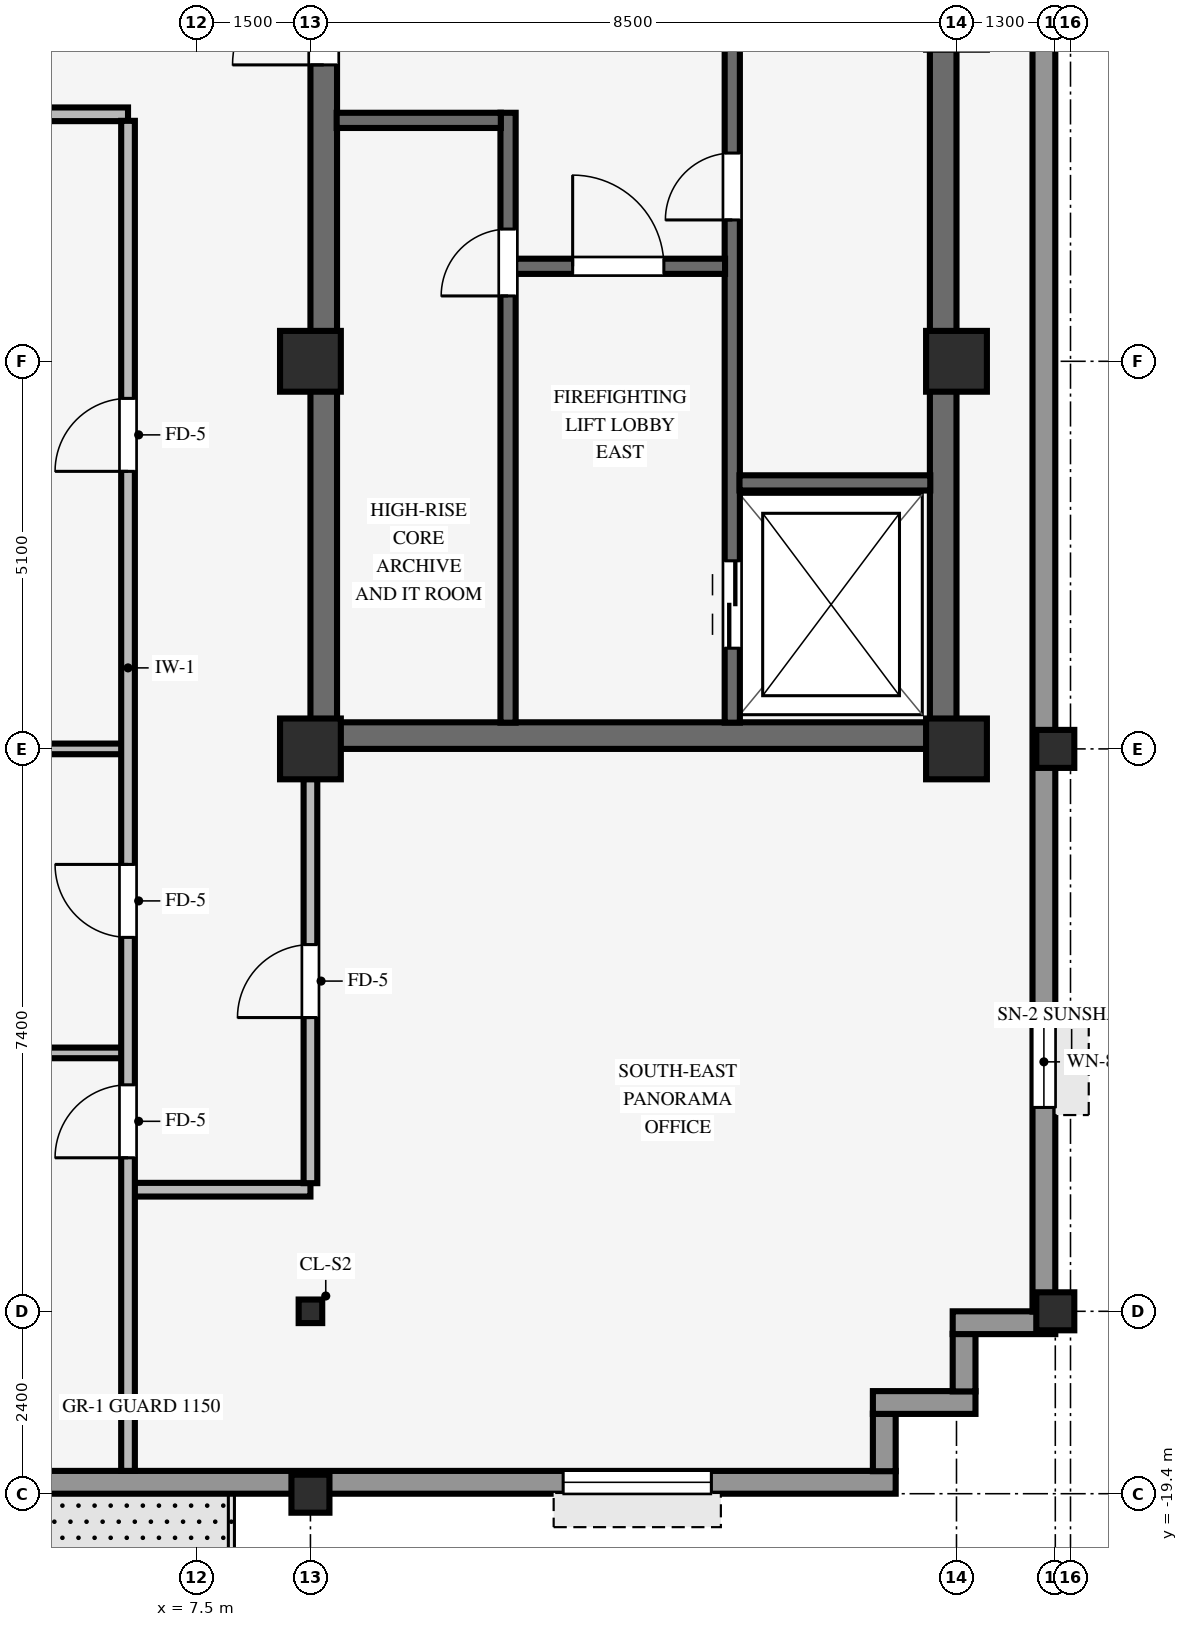
"""IFC4 building model, lengths in metres.
Left out: names, types, materials, properties, quantities, classifications, styles, units other than length and angle.
Written with IfcOpenShell. Run it as: python <this file> out.ifc"""

import sys

from ifc_helpers import new_model, si_unit, direction, frame, frame_2d, origin, origin_2d, place, context, subcontext, project, spatial, rectangle, hollow_rectangle, i_section, extrude, source, transform, mapped, element, fill, save


model = new_model("IFC4")
c1 = context("Model", 3, precision=1e-05, world=origin(), true_north=direction((0.0, 1.0)))
c2 = subcontext(c1, "Body", "Model", "MODEL_VIEW")
j1 = project(units=[si_unit("LENGTHUNIT", "METRE"), si_unit("PLANEANGLEUNIT", "RADIAN")], contexts=[c1])
p1 = place(None, origin())
s1 = spatial("IfcSite", under=j1, at=p1, CompositionType="ELEMENT")
p2 = place(p1, origin())
s2 = spatial("IfcBuilding", under=s1, at=p2, CompositionType="ELEMENT")
p3 = place(p2, frame((0.0, 0.0, 276.2)))
s3 = spatial("IfcBuildingStorey", under=s2, at=p3, CompositionType="ELEMENT", Elevation=276.2)
p4 = place(p3, frame((9.0, -9.425, 0.0), z_axis=(0.0, 0.0, 1.0), x_axis=(1.0, 0.0, 0.0)))
e1 = element("IfcWall", 1, at=p4, inside=s3, PredefinedType="SHEAR", context=c2, shape_type="SweptSolid", body=[
    extrude(rectangle(XDim=8.5, YDim=0.35, at=frame_2d((4.25, 0.0))), origin(), (0.0, 0.0, 1.0), 3.37),
])
p5 = place(p3, frame((9.175, -9.255, 0.0), z_axis=(0.0, 0.0, 1.0), x_axis=(0.0, 1.0, 0.0)))
e2 = element("IfcWall", 2, at=p5, inside=s3, PredefinedType="SHEAR", context=c2, shape_type="SweptSolid", body=[
    extrude(rectangle(XDim=18.51, YDim=0.35, at=frame_2d((9.255, 0.0))), origin(), (0.0, 0.0, 1.0), 3.37),
])
p6 = place(p5, frame((8.655, 0.0, 0.0)))
e3 = element("IfcOpeningElement", 3, at=p6, cuts=e2, PredefinedType="OPENING", context=c2, shape_type="SweptSolid", body=[
    extrude(rectangle(XDim=1.2, YDim=2.15, at=frame_2d((0.6, 1.075))), frame((0.0, 0.185, 0.0), z_axis=(0.0, -1.0, 0.0), x_axis=(1.0, 0.0, 0.0)), (0.0, 0.0, 1.0), 0.37),
])
p7 = place(p3, frame((17.325, -9.255, 0.0), z_axis=(0.0, 0.0, 1.0), x_axis=(0.0, 1.0, 0.0)))
e4 = element("IfcWall", 4, at=p7, inside=s3, PredefinedType="SHEAR", context=c2, shape_type="SweptSolid", body=[
    extrude(rectangle(XDim=18.51, YDim=0.35, at=frame_2d((9.255, 0.0))), origin(), (0.0, 0.0, 1.0), 3.37),
])
for number, where, z_axis, x_axis in (
    (5, (9.0, -9.6, 0.0), (0.0, 0.0, 1.0), (1.0, 0.0, 0.0)),
    (6, (9.0, -4.5, 0.0), (0.0, 0.0, 1.0), (1.0, 0.0, 0.0)),
    (7, (17.5, -9.6, 0.0), (0.0, 0.0, 1.0), (1.0, 0.0, 0.0)),
    (8, (17.5, -4.5, 0.0), (0.0, 0.0, 1.0), (1.0, 0.0, 0.0)),
):
    element("IfcColumn", number, at=place(p3, frame(where, z_axis=z_axis, x_axis=x_axis)), inside=s3, PredefinedType="COLUMN", context=c2, shape_type="SweptSolid", body=[
        extrude(rectangle(XDim=0.8, YDim=0.8, at=origin_2d()), origin(), (0.0, 0.0, 1.0), 3.37),
    ])
for number, where, z_axis, x_axis in (
    (9, (18.8, -17.0, 0.0), (0.0, 0.0, 1.0), (1.0, 0.0, 0.0)),
    (10, (18.8, -9.6, 0.0), (0.0, 0.0, 1.0), (1.0, 0.0, 0.0)),
    (11, (9.0, -19.4, 0.0), (0.0, 0.0, 1.0), (1.0, 0.0, 0.0)),
):
    element("IfcColumn", number, at=place(p3, frame(where, z_axis=z_axis, x_axis=x_axis)), inside=s3, PredefinedType="COLUMN", context=c2, shape_type="SweptSolid", body=[
        extrude(hollow_rectangle(XDim=0.5, YDim=0.5, WallThickness=0.032, InnerFilletRadius=0.032, OuterFilletRadius=0.064, at=origin_2d()), origin(), (0.0, 0.0, 1.0), 3.37),
    ])
p8 = place(p3, frame((9.0, -17.0, 0.0), z_axis=(0.0, 0.0, 1.0), x_axis=(1.0, 0.0, 0.0)))
e12 = element("IfcColumn", 12, at=p8, inside=s3, PredefinedType="COLUMN", context=c2, shape_type="SweptSolid", body=[
    extrude(i_section(OverallWidth=0.31, OverallDepth=0.31, WebThickness=0.015, FlangeThickness=0.015, FilletRadius=0.015, at=origin_2d()), origin(), (0.0, 0.0, 1.0), 3.37),
])
p9 = place(p3, frame((-18.9, -19.25, 0.0), z_axis=(0.0, 0.0, 1.0), x_axis=(1.0, 0.0, 0.0)))
e13 = element("IfcWall", 13, at=p9, inside=s3, PredefinedType="STANDARD", context=c2, shape_type="SweptSolid", body=[
    extrude(rectangle(XDim=35.6, YDim=0.3, at=frame_2d((17.8, 0.0))), origin(), (0.0, 0.0, 1.0), 2.705),
])
p10 = place(p9, frame((24.15, 0.0, 0.0), z_axis=(0.0, 0.0, 1.0), x_axis=(-1.0, 0.0, 0.0)))
e14 = element("IfcOpeningElement", 14, at=p10, cuts=e13, PredefinedType="OPENING", context=c2, shape_type="SweptSolid", body=[
    extrude(rectangle(XDim=1.05, YDim=2.1, at=frame_2d((0.525, 1.05))), frame((0.0, 0.16, 0.0), z_axis=(0.0, -1.0, 0.0), x_axis=(1.0, 0.0, 0.0)), (0.0, 0.0, 1.0), 0.32),
])
p11 = place(p9, frame((1.075, 0.0, 0.8)))
e15 = element("IfcOpeningElement", 15, at=p11, cuts=e13, PredefinedType="OPENING", context=c2, shape_type="SweptSolid", body=[
    extrude(rectangle(XDim=1.95, YDim=1.48, at=frame_2d((0.975, 0.74))), frame((0.0, 0.16, 0.0), z_axis=(0.0, -1.0, 0.0), x_axis=(1.0, 0.0, 0.0)), (0.0, 0.0, 1.0), 0.32),
])
p12 = place(p9, frame((7.225, 0.0, 0.8)))
e16 = element("IfcOpeningElement", 16, at=p12, cuts=e13, PredefinedType="OPENING", context=c2, shape_type="SweptSolid", body=[
    extrude(rectangle(XDim=1.95, YDim=1.48, at=frame_2d((0.975, 0.74))), frame((0.0, 0.16, 0.0), z_axis=(0.0, -1.0, 0.0), x_axis=(1.0, 0.0, 0.0)), (0.0, 0.0, 1.0), 0.32),
])
p13 = place(p9, frame((12.925, 0.0, 0.8)))
e17 = element("IfcOpeningElement", 17, at=p13, cuts=e13, PredefinedType="OPENING", context=c2, shape_type="SweptSolid", body=[
    extrude(rectangle(XDim=1.95, YDim=1.48, at=frame_2d((0.975, 0.74))), frame((0.0, 0.16, 0.0), z_axis=(0.0, -1.0, 0.0), x_axis=(1.0, 0.0, 0.0)), (0.0, 0.0, 1.0), 0.32),
])
p14 = place(p9, frame((15.475, 0.0, 0.8)))
e18 = element("IfcOpeningElement", 18, at=p14, cuts=e13, PredefinedType="OPENING", context=c2, shape_type="SweptSolid", body=[
    extrude(rectangle(XDim=1.95, YDim=1.48, at=frame_2d((0.975, 0.74))), frame((0.0, 0.16, 0.0), z_axis=(0.0, -1.0, 0.0), x_axis=(1.0, 0.0, 0.0)), (0.0, 0.0, 1.0), 0.32),
])
p15 = place(p9, frame((20.725, 0.0, 0.8)))
e19 = element("IfcOpeningElement", 19, at=p15, cuts=e13, PredefinedType="OPENING", context=c2, shape_type="SweptSolid", body=[
    extrude(rectangle(XDim=1.95, YDim=1.48, at=frame_2d((0.975, 0.74))), frame((0.0, 0.16, 0.0), z_axis=(0.0, -1.0, 0.0), x_axis=(1.0, 0.0, 0.0)), (0.0, 0.0, 1.0), 0.32),
])
p16 = place(p9, frame((31.225, 0.0, 0.8)))
e20 = element("IfcOpeningElement", 20, at=p16, cuts=e13, PredefinedType="OPENING", context=c2, shape_type="SweptSolid", body=[
    extrude(rectangle(XDim=1.95, YDim=1.48, at=frame_2d((0.975, 0.74))), frame((0.0, 0.16, 0.0), z_axis=(0.0, -1.0, 0.0), x_axis=(1.0, 0.0, 0.0)), (0.0, 0.0, 1.0), 0.32),
])
p17 = place(p3, frame((16.55, -19.104, 0.0), z_axis=(0.0, 0.0, 1.0), x_axis=(0.0, 1.0, 0.0)))
e21 = element("IfcWall", 21, at=p17, inside=s3, PredefinedType="STANDARD", context=c2, shape_type="SweptSolid", body=[
    extrude(rectangle(XDim=0.758, YDim=0.3, at=frame_2d((0.379, 0.0))), origin(), (0.0, 0.0, 1.0), 2.892),
])
p18 = place(p3, frame((16.4, -18.2, 0.0), z_axis=(0.0, 0.0, 1.0), x_axis=(1.0, 0.0, 0.0)))
e22 = element("IfcWall", 22, at=p18, inside=s3, PredefinedType="STANDARD", context=c2, shape_type="SweptSolid", body=[
    extrude(rectangle(XDim=1.35, YDim=0.3, at=frame_2d((0.675, 0.0))), origin(), (0.0, 0.0, 1.0), 2.892),
])
p19 = place(p3, frame((17.6, -18.054, 0.0), z_axis=(0.0, 0.0, 1.0), x_axis=(0.0, 1.0, 0.0)))
e23 = element("IfcWall", 23, at=p19, inside=s3, PredefinedType="STANDARD", context=c2, shape_type="SweptSolid", body=[
    extrude(rectangle(XDim=0.758, YDim=0.3, at=frame_2d((0.379, 0.0))), origin(), (0.0, 0.0, 1.0), 2.892),
])
p20 = place(p3, frame((17.45, -17.15, 0.0), z_axis=(0.0, 0.0, 1.0), x_axis=(1.0, 0.0, 0.0)))
e24 = element("IfcWall", 24, at=p20, inside=s3, PredefinedType="STANDARD", context=c2, shape_type="SweptSolid", body=[
    extrude(rectangle(XDim=1.35, YDim=0.3, at=frame_2d((0.675, 0.0))), origin(), (0.0, 0.0, 1.0), 2.892),
])
p21 = place(p3, frame((18.65, -17.004, 0.0), z_axis=(0.0, 0.0, 1.0), x_axis=(0.0, 1.0, 0.0)))
e25 = element("IfcWall", 25, at=p21, inside=s3, PredefinedType="STANDARD", context=c2, shape_type="SweptSolid", body=[
    extrude(rectangle(XDim=34.008, YDim=0.3, at=frame_2d((17.004, 0.0))), origin(), (0.0, 0.0, 1.0), 2.705),
])
p22 = place(p21, frame((2.686, 0.0, 0.8)))
e26 = element("IfcOpeningElement", 26, at=p22, cuts=e25, PredefinedType="OPENING", context=c2, shape_type="SweptSolid", body=[
    extrude(rectangle(XDim=1.2, YDim=1.48, at=frame_2d((0.6, 0.74))), frame((0.0, 0.16, 0.0), z_axis=(0.0, -1.0, 0.0), x_axis=(1.0, 0.0, 0.0)), (0.0, 0.0, 1.0), 0.32),
])
p23 = place(p21, frame((30.122, 0.0, 0.8)))
e27 = element("IfcOpeningElement", 27, at=p23, cuts=e25, PredefinedType="OPENING", context=c2, shape_type="SweptSolid", body=[
    extrude(rectangle(XDim=1.2, YDim=1.48, at=frame_2d((0.6, 0.74))), frame((0.0, 0.16, 0.0), z_axis=(0.0, -1.0, 0.0), x_axis=(1.0, 0.0, 0.0)), (0.0, 0.0, 1.0), 0.32),
])
p24 = place(p3, frame((14.55, -9.255, 0.0), z_axis=(0.0, 0.0, 1.0), x_axis=(0.0, 1.0, 0.0)))
e28 = element("IfcWall", 28, at=p24, inside=s3, PredefinedType="SHEAR", context=c2, shape_type="SweptSolid", body=[
    extrude(rectangle(XDim=10.16, YDim=0.2, at=frame_2d((5.08, 0.0))), origin(), (0.0, 0.0, 1.0), 3.37),
])
p25 = place(p24, frame((6.615, 0.0, 0.0)))
e29 = element("IfcOpeningElement", 29, at=p25, cuts=e28, PredefinedType="OPENING", context=c2, shape_type="SweptSolid", body=[
    extrude(rectangle(XDim=0.88, YDim=2.1, at=frame_2d((0.44, 1.05))), frame((0.0, 0.11, 0.0), z_axis=(0.0, -1.0, 0.0), x_axis=(1.0, 0.0, 0.0)), (0.0, 0.0, 1.0), 0.22),
])
p26 = place(p24, frame((0.98, 0.0, 0.0)))
e30 = element("IfcOpeningElement", 30, at=p26, cuts=e28, PredefinedType="OPENING", context=c2, shape_type="SweptSolid", body=[
    extrude(rectangle(XDim=1.15, YDim=2.15, at=frame_2d((0.575, 1.075))), frame((0.0, 0.11, 0.0), z_axis=(0.0, -1.0, 0.0), x_axis=(1.0, 0.0, 0.0)), (0.0, 0.0, 1.0), 0.22),
])
p27 = place(p3, frame((14.645, -6.1, 0.0), z_axis=(0.0, 0.0, 1.0), x_axis=(1.0, 0.0, 0.0)))
e31 = element("IfcWall", 31, at=p27, inside=s3, PredefinedType="SHEAR", context=c2, shape_type="SweptSolid", body=[
    extrude(rectangle(XDim=2.51, YDim=0.2, at=frame_2d((1.255, 0.0))), origin(), (0.0, 0.0, 1.0), 3.37),
])
p28 = place(p3, frame((11.6, -9.255, 0.0), z_axis=(0.0, 0.0, 1.0), x_axis=(0.0, 1.0, 0.0)))
e32 = element("IfcWall", 32, at=p28, inside=s3, PredefinedType="SHEAR", context=c2, shape_type="SweptSolid", body=[
    extrude(rectangle(XDim=8.025, YDim=0.2, at=frame_2d((4.012, 0.0))), origin(), (0.0, 0.0, 1.0), 3.37),
])
p29 = place(p28, frame((5.615, 0.0, 0.0)))
e33 = element("IfcOpeningElement", 33, at=p29, cuts=e32, PredefinedType="OPENING", context=c2, shape_type="SweptSolid", body=[
    extrude(rectangle(XDim=0.88, YDim=2.1, at=frame_2d((0.44, 1.05))), frame((0.0, 0.11, 0.0), z_axis=(0.0, -1.0, 0.0), x_axis=(1.0, 0.0, 0.0)), (0.0, 0.0, 1.0), 0.22),
])
p30 = place(p3, frame((11.695, -3.25, 0.0), z_axis=(0.0, 0.0, 1.0), x_axis=(1.0, 0.0, 0.0)))
e34 = element("IfcWall", 34, at=p30, inside=s3, PredefinedType="SHEAR", context=c2, shape_type="SweptSolid", body=[
    extrude(rectangle(XDim=2.76, YDim=0.2, at=frame_2d((1.38, 0.0))), origin(), (0.0, 0.0, 1.0), 3.37),
])
p31 = place(p30, frame((0.755, 0.0, 0.0)))
e35 = element("IfcOpeningElement", 35, at=p31, cuts=e34, PredefinedType="OPENING", context=c2, shape_type="SweptSolid", body=[
    extrude(rectangle(XDim=1.2, YDim=2.15, at=frame_2d((0.6, 1.075))), frame((0.0, 0.11, 0.0), z_axis=(0.0, -1.0, 0.0), x_axis=(1.0, 0.0, 0.0)), (0.0, 0.0, 1.0), 0.22),
])
p32 = place(p3, frame((9.345, -1.33, 0.0), z_axis=(0.0, 0.0, 1.0), x_axis=(1.0, 0.0, 0.0)))
e36 = element("IfcWall", 36, at=p32, inside=s3, PredefinedType="SHEAR", context=c2, shape_type="SweptSolid", body=[
    extrude(rectangle(XDim=2.16, YDim=0.2, at=frame_2d((1.08, 0.0))), origin(), (0.0, 0.0, 1.0), 3.37),
])
p33 = place(p3, frame((6.666, -15.4, 0.0), z_axis=(0.0, 0.0, 1.0), x_axis=(1.0, 0.0, 0.0)))
e37 = element("IfcWall", 37, at=p33, inside=s3, PredefinedType="PARTITIONING", context=c2, shape_type="SweptSolid", body=[
    extrude(rectangle(XDim=2.334, YDim=0.18, at=frame_2d((1.167, 0.0))), origin(), (0.0, 0.0, 1.0), 3.36),
])
p34 = place(p3, frame((-6.524, -13.6, 0.0), z_axis=(0.0, 0.0, 1.0), x_axis=(1.0, 0.0, 0.0)))
e38 = element("IfcWall", 38, at=p34, inside=s3, PredefinedType="PARTITIONING", context=c2, shape_type="SweptSolid", body=[
    extrude(rectangle(XDim=13.058, YDim=0.14, at=frame_2d((6.529, 0.0))), origin(), (0.0, 0.0, 1.0), 3.038),
])
p35 = place(p3, frame((0.151, -9.6, 0.0), z_axis=(0.0, 0.0, 1.0), x_axis=(1.0, 0.0, 0.0)))
e39 = element("IfcWall", 39, at=p35, inside=s3, PredefinedType="PARTITIONING", context=c2, shape_type="SweptSolid", body=[
    extrude(rectangle(XDim=6.383, YDim=0.14, at=frame_2d((3.191, 0.0))), origin(), (0.0, 0.0, 1.0), 2.405),
])
p36 = place(p3, frame((-6.6, -1.25, 0.0), z_axis=(0.0, 0.0, 1.0), x_axis=(1.0, 0.0, 0.0)))
e40 = element("IfcWall", 40, at=p36, inside=s3, PredefinedType="PARTITIONING", context=c2, shape_type="SweptSolid", body=[
    extrude(rectangle(XDim=13.2, YDim=0.18, at=frame_2d((6.6, 0.0))), origin(), (0.0, 0.0, 1.0), 3.36),
])
p37 = place(p36, frame((3.82, 0.0, 0.0)))
e41 = element("IfcOpeningElement", 41, at=p37, cuts=e40, PredefinedType="OPENING", context=c2, shape_type="SweptSolid", body=[
    extrude(rectangle(XDim=0.96, YDim=2.1, at=frame_2d((0.48, 1.05))), frame((0.0, 0.1, 0.0), z_axis=(0.0, -1.0, 0.0), x_axis=(1.0, 0.0, 0.0)), (0.0, 0.0, 1.0), 0.2),
])
p38 = place(p3, frame((6.6, -19.1, 0.0), z_axis=(0.0, 0.0, 1.0), x_axis=(0.0, 1.0, 0.0)))
e42 = element("IfcWall", 42, at=p38, inside=s3, PredefinedType="PARTITIONING", context=c2, shape_type="SweptSolid", body=[
    extrude(rectangle(XDim=17.764, YDim=0.18, at=frame_2d((8.882, 0.0))), origin(), (0.0, 0.0, 1.0), 3.36),
])
p39 = place(p38, frame((13.152, 0.0, 0.0)))
e43 = element("IfcOpeningElement", 43, at=p39, cuts=e42, PredefinedType="OPENING", context=c2, shape_type="SweptSolid", body=[
    extrude(rectangle(XDim=0.96, YDim=2.1, at=frame_2d((0.48, 1.05))), frame((0.0, 0.1, 0.0), z_axis=(0.0, -1.0, 0.0), x_axis=(1.0, 0.0, 0.0)), (0.0, 0.0, 1.0), 0.2),
])
p40 = place(p38, frame((7.02, 0.0, 0.0)))
e44 = element("IfcOpeningElement", 44, at=p40, cuts=e42, PredefinedType="OPENING", context=c2, shape_type="SweptSolid", body=[
    extrude(rectangle(XDim=0.96, YDim=2.1, at=frame_2d((0.48, 1.05))), frame((0.0, 0.1, 0.0), z_axis=(0.0, -1.0, 0.0), x_axis=(1.0, 0.0, 0.0)), (0.0, 0.0, 1.0), 0.2),
])
p41 = place(p38, frame((4.12, 0.0, 0.0)))
e45 = element("IfcOpeningElement", 45, at=p41, cuts=e42, PredefinedType="OPENING", context=c2, shape_type="SweptSolid", body=[
    extrude(rectangle(XDim=0.96, YDim=2.1, at=frame_2d((0.48, 1.05))), frame((0.0, 0.1, 0.0), z_axis=(0.0, -1.0, 0.0), x_axis=(1.0, 0.0, 0.0)), (0.0, 0.0, 1.0), 0.2),
])
p42 = place(p3, frame((9.0, -15.314, 0.0), z_axis=(0.0, 0.0, 1.0), x_axis=(0.0, 1.0, 0.0)))
e46 = element("IfcWall", 46, at=p42, inside=s3, PredefinedType="PARTITIONING", context=c2, shape_type="SweptSolid", body=[
    extrude(rectangle(XDim=5.318, YDim=0.18, at=frame_2d((2.659, 0.0))), origin(), (0.0, 0.0, 1.0), 2.892),
])
p43 = place(p42, frame((2.179, 0.0, 0.0)))
e47 = element("IfcOpeningElement", 47, at=p43, cuts=e46, PredefinedType="OPENING", context=c2, shape_type="SweptSolid", body=[
    extrude(rectangle(XDim=0.96, YDim=2.1, at=frame_2d((0.48, 1.05))), frame((0.0, 0.1, 0.0), z_axis=(0.0, -1.0, 0.0), x_axis=(1.0, 0.0, 0.0)), (0.0, 0.0, 1.0), 0.2),
])
m1 = source(origin(), c2, "Body", "SweptSolid", [
    extrude(rectangle(XDim=1.95, YDim=1.48, at=frame_2d((0.975, 0.74))), frame((0.0, 0.03, 0.0), z_axis=(0.0, -1.0, 0.0), x_axis=(1.0, 0.0, 0.0)), (0.0, 0.0, 1.0), 0.06),
])
p44 = place(p16, origin())
e48 = element("IfcWindow", 48, at=p44, inside=s3, PartitioningType="SINGLE_PANEL", PredefinedType="WINDOW", context=c2, shape_type="MappedRepresentation", body=[
    mapped(m1, transform((0.0, 0.0, 0.0), scale=1.0)),
])
fill(e20, e48)
m2 = source(origin(), c2, "Body", "SweptSolid", [
    extrude(rectangle(XDim=1.2, YDim=1.48, at=frame_2d((0.6, 0.74))), frame((0.0, 0.03, 0.0), z_axis=(0.0, -1.0, 0.0), x_axis=(1.0, 0.0, 0.0)), (0.0, 0.0, 1.0), 0.06),
])
p45 = place(p22, origin())
e49 = element("IfcWindow", 49, at=p45, inside=s3, PartitioningType="SINGLE_PANEL", PredefinedType="WINDOW", context=c2, shape_type="MappedRepresentation", body=[
    mapped(m2, transform((0.0, 0.0, 0.0), scale=1.0)),
])
fill(e26, e49)
m3 = source(origin(), c2, "Body", "SweptSolid", [
    extrude(rectangle(XDim=0.88, YDim=2.1, at=frame_2d((0.44, 1.05))), frame((0.0, 0.025, 0.0), z_axis=(0.0, -1.0, 0.0), x_axis=(1.0, 0.0, 0.0)), (0.0, 0.0, 1.0), 0.05),
])
p46 = place(p25, origin())
e50 = element("IfcDoor", 50, at=p46, inside=s3, OperationType="SINGLE_SWING_LEFT", PredefinedType="DOOR", context=c2, shape_type="MappedRepresentation", body=[
    mapped(m3, transform((0.0, 0.0, 0.0), scale=1.0)),
])
fill(e29, e50)
m4 = source(origin(), c2, "Body", "SweptSolid", [
    extrude(rectangle(XDim=1.2, YDim=2.15, at=frame_2d((0.6, 1.075))), frame((0.0, 0.025, 0.0), z_axis=(0.0, -1.0, 0.0), x_axis=(1.0, 0.0, 0.0)), (0.0, 0.0, 1.0), 0.05),
])
p47 = place(p31, origin())
e51 = element("IfcDoor", 51, at=p47, inside=s3, OperationType="SINGLE_SWING_LEFT", PredefinedType="DOOR", context=c2, shape_type="MappedRepresentation", body=[
    mapped(m4, transform((0.0, 0.0, 0.0), scale=1.0)),
])
fill(e35, e51)
p48 = place(p29, origin())
e52 = element("IfcDoor", 52, at=p48, inside=s3, OperationType="SINGLE_SWING_LEFT", PredefinedType="DOOR", context=c2, shape_type="MappedRepresentation", body=[
    mapped(m3, transform((0.0, 0.0, 0.0), scale=1.0)),
])
fill(e33, e52)
p49 = place(p6, origin())
e53 = element("IfcDoor", 53, at=p49, inside=s3, OperationType="SINGLE_SWING_LEFT", PredefinedType="DOOR", context=c2, shape_type="MappedRepresentation", body=[
    mapped(m4, transform((0.0, 0.0, 0.0), scale=1.0)),
])
fill(e3, e53)
m5 = source(origin(), c2, "Body", "SweptSolid", [
    extrude(rectangle(XDim=1.15, YDim=2.15, at=frame_2d((0.575, 1.075))), frame((0.0, 0.025, 0.0), z_axis=(0.0, -1.0, 0.0), x_axis=(1.0, 0.0, 0.0)), (0.0, 0.0, 1.0), 0.05),
])
p50 = place(p26, origin())
e54 = element("IfcDoor", 54, at=p50, inside=s3, OperationType="DOUBLE_DOOR_SLIDING", PredefinedType="DOOR", context=c2, shape_type="MappedRepresentation", body=[
    mapped(m5, transform((0.0, 0.0, 0.0), scale=1.0)),
])
fill(e30, e54)
m6 = source(origin(), c2, "Body", "SweptSolid", [
    extrude(rectangle(XDim=0.96, YDim=2.1, at=frame_2d((0.48, 1.05))), frame((0.0, 0.025, 0.0), z_axis=(0.0, -1.0, 0.0), x_axis=(1.0, 0.0, 0.0)), (0.0, 0.0, 1.0), 0.05),
])
p51 = place(p39, origin())
e55 = element("IfcDoor", 55, at=p51, inside=s3, OperationType="SINGLE_SWING_LEFT", PredefinedType="DOOR", context=c2, shape_type="MappedRepresentation", body=[
    mapped(m6, transform((0.0, 0.0, 0.0), scale=1.0)),
])
fill(e43, e55)
p52 = place(p43, origin())
e56 = element("IfcDoor", 56, at=p52, inside=s3, OperationType="SINGLE_SWING_LEFT", PredefinedType="DOOR", context=c2, shape_type="MappedRepresentation", body=[
    mapped(m6, transform((0.0, 0.0, 0.0), scale=1.0)),
])
fill(e47, e56)
p53 = place(p40, origin())
e57 = element("IfcDoor", 57, at=p53, inside=s3, OperationType="SINGLE_SWING_RIGHT", PredefinedType="DOOR", context=c2, shape_type="MappedRepresentation", body=[
    mapped(m6, transform((0.0, 0.0, 0.0), scale=1.0)),
])
fill(e44, e57)
p54 = place(p41, origin())
e58 = element("IfcDoor", 58, at=p54, inside=s3, OperationType="SINGLE_SWING_LEFT", PredefinedType="DOOR", context=c2, shape_type="MappedRepresentation", body=[
    mapped(m6, transform((0.0, 0.0, 0.0), scale=1.0)),
])
fill(e45, e58)
save(model, sys.argv[1])
